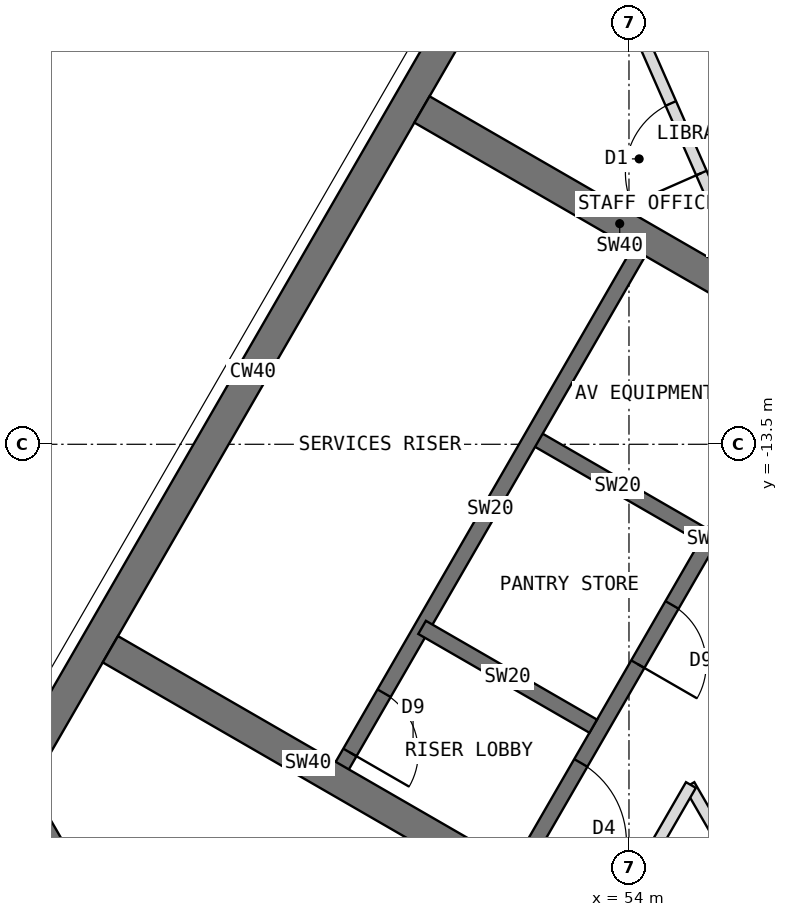
"""IFC4 building model, lengths in metres.
Left out: names, types, materials, properties, quantities, classifications, styles, units other than length and angle.
Written with IfcOpenShell. Run it as: python <this file> out.ifc"""

import sys

from ifc_helpers import new_model, si_unit, direction, frame, frame_2d, origin, place, context, subcontext, project, spatial, rectangle, extrude, element, fill, save


model = new_model("IFC4")
c1 = context("Model", 3, precision=1e-05, world=origin(), true_north=direction((0.0, 1.0)))
c2 = subcontext(c1, "Body", "Model", "MODEL_VIEW")
j1 = project(units=[si_unit("LENGTHUNIT", "METRE"), si_unit("PLANEANGLEUNIT", "RADIAN")], contexts=[c1])
p1 = place(None, origin())
s1 = spatial("IfcSite", under=j1, at=p1, CompositionType="ELEMENT")
p2 = place(p1, origin())
s2 = spatial("IfcBuilding", under=s1, at=p2, CompositionType="ELEMENT")
p3 = place(p2, frame((0.0, 0.0, 255.5)))
s3 = spatial("IfcBuildingStorey", under=s2, at=p3, CompositionType="ELEMENT", Elevation=255.5)
p4 = place(p3, frame((52.202, -7.092, 0.0), z_axis=(0.0, 0.0, 1.0), x_axis=(-0.500005998175, -0.866021940709, 0.0)))
e1 = element("IfcWall", 1, at=p4, inside=s3, PredefinedType="SHEAR", context=c2, shape_type="SweptSolid", body=[
    extrude(rectangle(XDim=12.596, YDim=0.4, at=frame_2d((6.298, 0.0))), origin(), (0.0, 0.0, 1.0), 4.0),
])
p5 = place(p3, frame((45.904, -18.0, 0.0), z_axis=(0.0, 0.0, 1.0), x_axis=(0.500024481964, -0.866011268655, 0.0)))
e2 = element("IfcWall", 2, at=p5, inside=s3, PredefinedType="SHEAR", context=c2, shape_type="SweptSolid", body=[
    extrude(rectangle(XDim=4.548, YDim=0.4, at=frame_2d((2.274, 0.0))), origin(), (0.0, 0.0, 1.0), 4.0),
])
p6 = place(p3, frame((56.516, -12.236, 0.0), z_axis=(0.0, 0.0, 1.0), x_axis=(-0.49999894854, -0.866026010844, 0.0)))
e3 = element("IfcWall", 3, at=p6, inside=s3, PredefinedType="SHEAR", context=c2, shape_type="SweptSolid", body=[
    extrude(rectangle(XDim=8.0, YDim=0.2, at=frame_2d((4.0, 0.0))), origin(), (0.0, 0.0, 1.0), 4.0),
])
p7 = place(p6, frame((6.3, 0.0, 0.0)))
e4 = element("IfcOpeningElement", 4, at=p7, cuts=e3, PredefinedType="OPENING", context=c2, shape_type="SweptSolid", body=[
    extrude(rectangle(XDim=1.2, YDim=2.1, at=frame_2d((0.6, 1.05))), frame((0.0, 0.11, 0.0), z_axis=(0.0, -1.0, 0.0), x_axis=(1.0, 0.0, 0.0)), (0.0, 0.0, 1.0), 0.22),
])
p8 = place(p6, frame((1.0, 0.0, 0.0)))
e5 = element("IfcOpeningElement", 5, at=p8, cuts=e3, PredefinedType="OPENING", context=c2, shape_type="SweptSolid", body=[
    extrude(rectangle(XDim=0.9, YDim=2.1, at=frame_2d((0.45, 1.05))), frame((0.0, 0.11, 0.0), z_axis=(0.0, -1.0, 0.0), x_axis=(1.0, 0.0, 0.0)), (0.0, 0.0, 1.0), 0.22),
])
p9 = place(p6, frame((3.9, 0.0, 0.0)))
e6 = element("IfcOpeningElement", 6, at=p9, cuts=e3, PredefinedType="OPENING", context=c2, shape_type="SweptSolid", body=[
    extrude(rectangle(XDim=0.9, YDim=2.1, at=frame_2d((0.45, 1.05))), frame((0.0, 0.11, 0.0), z_axis=(0.0, -1.0, 0.0), x_axis=(1.0, 0.0, 0.0)), (0.0, 0.0, 1.0), 0.22),
])
for number, where, z_axis, x_axis in (
    (7, (54.98, -14.697, 0.0), (0.0, 0.0, 1.0), (-0.866, 0.5, 0.0)),
    (8, (53.53, -17.209, 0.0), (0.0, 0.0, 1.0), (-0.866, 0.5, 0.0)),
):
    element("IfcWall", number, at=place(p3, frame(where, z_axis=z_axis, x_axis=x_axis)), inside=s3, PredefinedType="SHEAR", context=c2, shape_type="SweptSolid", body=[
        extrude(rectangle(XDim=2.6, YDim=0.2, at=frame_2d((1.3, 0.0))), origin(), (0.0, 0.0, 1.0), 4.0),
    ])
p10 = place(p3, frame((54.178, -10.886, 0.0), z_axis=(0.0, 0.0, 1.0), x_axis=(-0.49999894854, -0.866026010844, 0.0)))
e9 = element("IfcWall", 9, at=p10, inside=s3, PredefinedType="SHEAR", context=c2, shape_type="SweptSolid", body=[
    extrude(rectangle(XDim=8.0, YDim=0.2, at=frame_2d((4.0, 0.0))), origin(), (0.0, 0.0, 1.0), 4.0),
])
p11 = place(p10, frame((6.8, 0.0, 0.0)))
e10 = element("IfcOpeningElement", 10, at=p11, cuts=e9, PredefinedType="OPENING", context=c2, shape_type="SweptSolid", body=[
    extrude(rectangle(XDim=0.9, YDim=2.1, at=frame_2d((0.45, 1.05))), frame((0.0, 0.11, 0.0), z_axis=(0.0, -1.0, 0.0), x_axis=(1.0, 0.0, 0.0)), (0.0, 0.0, 1.0), 0.22),
])
for number, where, z_axis, x_axis in (
    (11, (52.38, -19.201, 0.0), (0.0, 0.0, 1.0), (-0.866, 0.5, 0.0)),
    (12, (56.48, -12.099, 0.0), (0.0, 0.0, 1.0), (-0.866, 0.5, 0.0)),
):
    element("IfcWall", number, at=place(p3, frame(where, z_axis=z_axis, x_axis=x_axis)), inside=s3, PredefinedType="SHEAR", context=c2, shape_type="SweptSolid", body=[
        extrude(rectangle(XDim=6.008, YDim=0.4, at=frame_2d((3.004, 0.0))), origin(), (0.0, 0.0, 1.0), 4.0),
    ])
p12 = place(p3, frame((55.955, -19.992, 0.0), z_axis=(0.0, 0.0, 1.0), x_axis=(-0.499941024108, 0.866059450854, 0.0)))
e13 = element("IfcWall", 13, at=p12, inside=s3, PredefinedType="PARTITIONING", context=c2, shape_type="SweptSolid", body=[
    extrude(rectangle(XDim=2.321, YDim=0.15, at=frame_2d((1.16, 0.0))), origin(), (0.0, 0.0, 1.0), 3.8),
])
p13 = place(p3, frame((54.815, -17.983, 0.0), z_axis=(0.0, 0.0, 1.0), x_axis=(-0.499981473571, -0.866036099759, 0.0)))
e14 = element("IfcWall", 14, at=p13, inside=s3, PredefinedType="PARTITIONING", context=c2, shape_type="SweptSolid", body=[
    extrude(rectangle(XDim=2.692, YDim=0.15, at=frame_2d((1.346, 0.0))), origin(), (0.0, 0.0, 1.0), 3.8),
])
p14 = place(p3, frame((55.711, -11.656, 0.0), z_axis=(0.0, 0.0, 1.0), x_axis=(-0.402457111937, 0.915438841787, 0.0)))
e15 = element("IfcWall", 15, at=p14, inside=s3, PredefinedType="PARTITIONING", context=c2, shape_type="SweptSolid", body=[
    extrude(rectangle(XDim=4.767, YDim=0.15, at=frame_2d((2.383, 0.0))), origin(), (0.0, 0.0, 1.0), 3.8),
])
p15 = place(p14, frame((1.883, 0.0, 0.0)))
e16 = element("IfcOpeningElement", 16, at=p15, cuts=e15, PredefinedType="OPENING", context=c2, shape_type="SweptSolid", body=[
    extrude(rectangle(XDim=1.0, YDim=2.1, at=frame_2d((0.5, 1.05))), frame((0.0, 0.085, 0.0), z_axis=(0.0, -1.0, 0.0), x_axis=(1.0, 0.0, 0.0)), (0.0, 0.0, 1.0), 0.17),
])
p16 = place(p7, origin())
e17 = element("IfcDoor", 17, at=p16, inside=s3, OperationType="SINGLE_SWING_RIGHT", PredefinedType="DOOR", context=c2, shape_type="SweptSolid", body=[
    extrude(rectangle(XDim=1.2, YDim=2.1, at=frame_2d((0.6, 1.05))), frame((0.0, 0.025, 0.0), z_axis=(0.0, -1.0, 0.0), x_axis=(1.0, 0.0, 0.0)), (0.0, 0.0, 1.0), 0.05),
])
fill(e4, e17)
p17 = place(p11, origin())
e18 = element("IfcDoor", 18, at=p17, inside=s3, OperationType="SINGLE_SWING_RIGHT", PredefinedType="DOOR", context=c2, shape_type="SweptSolid", body=[
    extrude(rectangle(XDim=0.9, YDim=2.1, at=frame_2d((0.45, 1.05))), frame((0.0, 0.025, 0.0), z_axis=(0.0, -1.0, 0.0), x_axis=(1.0, 0.0, 0.0)), (0.0, 0.0, 1.0), 0.05),
])
fill(e10, e18)
p18 = place(p15, origin())
e19 = element("IfcDoor", 19, at=p18, inside=s3, OperationType="SINGLE_SWING_LEFT", PredefinedType="DOOR", context=c2, shape_type="SweptSolid", body=[
    extrude(rectangle(XDim=1.0, YDim=2.1, at=frame_2d((0.5, 1.05))), frame((0.0, 0.025, 0.0), z_axis=(0.0, -1.0, 0.0), x_axis=(1.0, 0.0, 0.0)), (0.0, 0.0, 1.0), 0.05),
])
fill(e16, e19)
p19 = place(p9, origin())
e20 = element("IfcDoor", 20, at=p19, inside=s3, OperationType="SINGLE_SWING_RIGHT", PredefinedType="DOOR", context=c2, shape_type="SweptSolid", body=[
    extrude(rectangle(XDim=0.9, YDim=2.1, at=frame_2d((0.45, 1.05))), frame((0.0, 0.025, 0.0), z_axis=(0.0, -1.0, 0.0), x_axis=(1.0, 0.0, 0.0)), (0.0, 0.0, 1.0), 0.05),
])
fill(e6, e20)
save(model, sys.argv[1])
